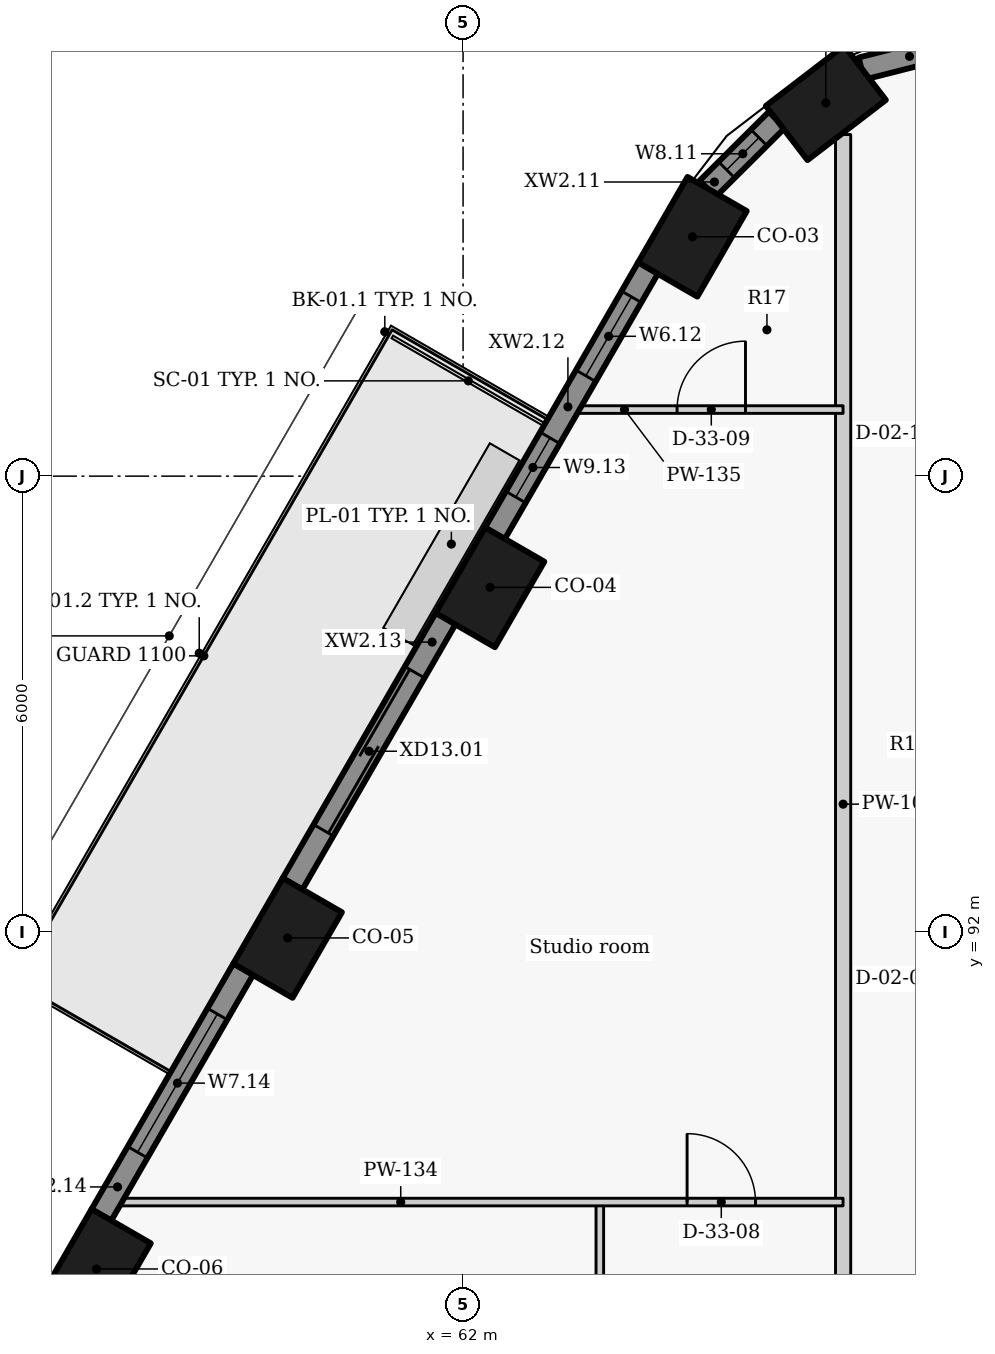
"""IFC4 building model, lengths in metres.
Left out: names, types, materials, properties, quantities, classifications, styles, units other than length and angle.
Written with IfcOpenShell. Run it as: python <this file> out.ifc"""

import sys

from ifc_helpers import new_model, si_unit, direction, frame, frame_2d, origin, origin_2d, place, context, subcontext, project, spatial, rectangle, extrude, element, fill, save


model = new_model("IFC4")
c1 = context("Model", 3, precision=1e-05, world=origin(), true_north=direction((0.0, 1.0)))
c2 = subcontext(c1, "Body", "Model", "MODEL_VIEW")
j1 = project(units=[si_unit("LENGTHUNIT", "METRE"), si_unit("PLANEANGLEUNIT", "RADIAN")], contexts=[c1])
p1 = place(None, origin())
s1 = spatial("IfcSite", under=j1, at=p1, CompositionType="ELEMENT")
p2 = place(p1, origin())
s2 = spatial("IfcBuilding", under=s1, at=p2, CompositionType="ELEMENT")
p3 = place(p2, frame((0.0, 0.0, 140.4)))
s3 = spatial("IfcBuildingStorey", under=s2, at=p3, CompositionType="ELEMENT", Elevation=140.4)
for number, where, z_axis, x_axis in (
    (1, (66.773, 102.91, 0.0), (0.0, 0.0, 1.0), (-0.793, -0.609, 0.0)),
    (2, (65.018, 101.149, 0.0), (0.0, 0.0, 1.0), (-0.5, -0.866, 0.0)),
    (3, (62.354, 96.537, 0.0), (0.0, 0.0, 1.0), (-0.5, -0.866, 0.0)),
    (4, (59.692, 91.925, 0.0), (0.0, 0.0, 1.0), (-0.5, -0.866, 0.0)),
    (5, (57.177, 87.57, 0.0), (0.0, 0.0, 1.0), (-0.5, -0.866, 0.0)),
):
    element("IfcColumn", number, at=place(p3, frame(where, z_axis=z_axis, x_axis=x_axis)), inside=s3, PredefinedType="COLUMN", context=c2, shape_type="SweptSolid", body=[
        extrude(rectangle(XDim=1.3, YDim=0.9, at=origin_2d()), origin(), (0.0, 0.0, 1.0), 3.3),
    ])
p4 = place(p3, frame((68.506, 103.683, 0.0), z_axis=(0.0, 0.0, 1.0), x_axis=(-0.96924493129, -0.246098076322, 0.0)))
e6 = element("IfcWall", 6, at=p4, inside=s3, PredefinedType="SOLIDWALL", context=c2, shape_type="SweptSolid", body=[
    extrude(rectangle(XDim=1.305, YDim=0.3, at=frame_2d((0.653, 0.0))), origin(), (0.0, 0.0, 1.0), 2.425),
])
p5 = place(p3, frame((66.129, 102.688, 0.0), z_axis=(0.0, 0.0, 1.0), x_axis=(-0.70881270082, -0.705396735997, 0.0)))
e7 = element("IfcWall", 7, at=p5, inside=s3, PredefinedType="SOLIDWALL", context=c2, shape_type="SweptSolid", body=[
    extrude(rectangle(XDim=1.286, YDim=0.3, at=frame_2d((0.643, 0.0))), origin(), (0.0, 0.0, 1.0), 2.425),
])
p6 = place(p5, frame((0.333, 0.0, 0.9)))
e8 = element("IfcOpeningElement", 8, at=p6, cuts=e7, PredefinedType="OPENING", context=c2, shape_type="SweptSolid", body=[
    extrude(rectangle(XDim=0.6, YDim=1.1, at=frame_2d((0.3, 0.55))), frame((0.0, 0.16, 0.0), z_axis=(0.0, -1.0, 0.0), x_axis=(1.0, 0.0, 0.0)), (0.0, 0.0, 1.0), 0.32),
])
p7 = place(p3, frame((64.435, 100.74, 0.0), z_axis=(0.0, 0.0, 1.0), x_axis=(-0.500031546601, -0.86600718958, 0.0)))
e9 = element("IfcWall", 9, at=p7, inside=s3, PredefinedType="SOLIDWALL", context=c2, shape_type="SweptSolid", body=[
    extrude(rectangle(XDim=4.034, YDim=0.3, at=frame_2d((2.017, 0.0))), origin(), (0.0, 0.0, 1.0), 2.425),
])
p8 = place(p7, frame((0.439, 0.0, 0.9)))
e10 = element("IfcOpeningElement", 10, at=p8, cuts=e9, PredefinedType="OPENING", context=c2, shape_type="SweptSolid", body=[
    extrude(rectangle(XDim=1.2, YDim=1.1, at=frame_2d((0.6, 0.55))), frame((0.0, 0.16, 0.0), z_axis=(0.0, -1.0, 0.0), x_axis=(1.0, 0.0, 0.0)), (0.0, 0.0, 1.0), 0.32),
])
p9 = place(p7, frame((2.583, 0.0, 0.9)))
e11 = element("IfcOpeningElement", 11, at=p9, cuts=e9, PredefinedType="OPENING", context=c2, shape_type="SweptSolid", body=[
    extrude(rectangle(XDim=0.9, YDim=1.1, at=frame_2d((0.45, 0.55))), frame((0.0, 0.16, 0.0), z_axis=(0.0, -1.0, 0.0), x_axis=(1.0, 0.0, 0.0)), (0.0, 0.0, 1.0), 0.32),
])
p10 = place(p3, frame((61.772, 96.128, 0.0), z_axis=(0.0, 0.0, 1.0), x_axis=(-0.500031546601, -0.86600718958, 0.0)))
e12 = element("IfcWall", 12, at=p10, inside=s3, PredefinedType="SOLIDWALL", context=c2, shape_type="SweptSolid", body=[
    extrude(rectangle(XDim=4.034, YDim=0.3, at=frame_2d((2.017, 0.0))), origin(), (0.0, 0.0, 1.0), 2.425),
])
p11 = place(p10, frame((0.817, 0.0, 0.0)))
e13 = element("IfcOpeningElement", 13, at=p11, cuts=e12, PredefinedType="OPENING", context=c2, shape_type="SweptSolid", body=[
    extrude(rectangle(XDim=2.4, YDim=2.0, at=frame_2d((1.2, 1.0))), frame((0.0, 0.16, 0.0), z_axis=(0.0, -1.0, 0.0), x_axis=(1.0, 0.0, 0.0)), (0.0, 0.0, 1.0), 0.32),
])
p12 = place(p3, frame((59.109, 91.515, 0.0), z_axis=(0.0, 0.0, 1.0), x_axis=(-0.499933594891, -0.866063739398, 0.0)))
e14 = element("IfcWall", 14, at=p12, inside=s3, PredefinedType="SOLIDWALL", context=c2, shape_type="SweptSolid", body=[
    extrude(rectangle(XDim=3.737, YDim=0.3, at=frame_2d((1.868, 0.0))), origin(), (0.0, 0.0, 1.0), 2.425),
])
p13 = place(p12, frame((0.683, 0.0, 0.9)))
e15 = element("IfcOpeningElement", 15, at=p13, cuts=e14, PredefinedType="OPENING", context=c2, shape_type="SweptSolid", body=[
    extrude(rectangle(XDim=2.1, YDim=1.1, at=frame_2d((1.05, 0.55))), frame((0.0, 0.16, 0.0), z_axis=(0.0, -1.0, 0.0), x_axis=(1.0, 0.0, 0.0)), (0.0, 0.0, 1.0), 0.32),
])
p14 = place(p3, frame((67.0, 56.833, 0.0), z_axis=(0.0, 0.0, 1.0), x_axis=(0.0, 1.0, 0.0)))
e16 = element("IfcWall", 16, at=p14, inside=s3, PredefinedType="PARTITIONING", context=c2, shape_type="SweptSolid", body=[
    extrude(rectangle(XDim=45.661, YDim=0.2, at=frame_2d((22.831, 0.0))), origin(), (0.0, 0.0, 1.0), 2.405),
])
p15 = place(p14, frame((7.584, 0.0, 0.0)))
e17 = element("IfcOpeningElement", 17, at=p15, cuts=e16, PredefinedType="OPENING", context=c2, shape_type="SweptSolid", body=[
    extrude(rectangle(XDim=1.0, YDim=2.1, at=frame_2d((0.5, 1.05))), frame((0.0, 0.11, 0.0), z_axis=(0.0, -1.0, 0.0), x_axis=(1.0, 0.0, 0.0)), (0.0, 0.0, 1.0), 0.22),
])
p16 = place(p14, frame((16.442, 0.0, 0.0)))
e18 = element("IfcOpeningElement", 18, at=p16, cuts=e16, PredefinedType="OPENING", context=c2, shape_type="SweptSolid", body=[
    extrude(rectangle(XDim=1.0, YDim=2.1, at=frame_2d((0.5, 1.05))), frame((0.0, 0.11, 0.0), z_axis=(0.0, -1.0, 0.0), x_axis=(1.0, 0.0, 0.0)), (0.0, 0.0, 1.0), 0.22),
])
p17 = place(p14, frame((26.942, 0.0, 0.0)))
e19 = element("IfcOpeningElement", 19, at=p17, cuts=e16, PredefinedType="OPENING", context=c2, shape_type="SweptSolid", body=[
    extrude(rectangle(XDim=1.0, YDim=2.1, at=frame_2d((0.5, 1.05))), frame((0.0, 0.11, 0.0), z_axis=(0.0, -1.0, 0.0), x_axis=(1.0, 0.0, 0.0)), (0.0, 0.0, 1.0), 0.22),
])
p18 = place(p3, frame((63.799, 85.05, 0.0), z_axis=(0.0, 0.0, 1.0), x_axis=(0.0, 1.0, 0.0)))
e20 = element("IfcWall", 20, at=p18, inside=s3, PredefinedType="PARTITIONING", context=c2, shape_type="SweptSolid", body=[
    extrude(rectangle(XDim=3.4, YDim=0.1, at=frame_2d((1.7, 0.0))), origin(), (0.0, 0.0, 1.0), 3.025),
])
p19 = place(p3, frame((57.512, 88.45, 0.0), z_axis=(0.0, 0.0, 1.0), x_axis=(1.0, 0.0, 0.0)))
e21 = element("IfcWall", 21, at=p19, inside=s3, PredefinedType="PARTITIONING", context=c2, shape_type="SweptSolid", body=[
    extrude(rectangle(XDim=9.487, YDim=0.1, at=frame_2d((4.743, 0.0))), origin(), (0.0, 0.0, 1.0), 2.405),
])
p20 = place(p19, frame((7.435, 0.0, 0.0)))
e22 = element("IfcOpeningElement", 22, at=p20, cuts=e21, PredefinedType="OPENING", context=c2, shape_type="SweptSolid", body=[
    extrude(rectangle(XDim=0.9, YDim=2.1, at=frame_2d((0.45, 1.05))), frame((0.0, 0.06, 0.0), z_axis=(0.0, -1.0, 0.0), x_axis=(1.0, 0.0, 0.0)), (0.0, 0.0, 1.0), 0.12),
])
p21 = place(p3, frame((63.531, 98.876, 0.0), z_axis=(0.0, 0.0, 1.0), x_axis=(1.0, 0.0, 0.0)))
e23 = element("IfcWall", 23, at=p21, inside=s3, PredefinedType="PARTITIONING", context=c2, shape_type="SweptSolid", body=[
    extrude(rectangle(XDim=3.468, YDim=0.1, at=frame_2d((1.734, 0.0))), origin(), (0.0, 0.0, 1.0), 2.405),
])
p22 = place(p21, frame((1.284, 0.0, 0.0)))
e24 = element("IfcOpeningElement", 24, at=p22, cuts=e23, PredefinedType="OPENING", context=c2, shape_type="SweptSolid", body=[
    extrude(rectangle(XDim=0.9, YDim=2.1, at=frame_2d((0.45, 1.05))), frame((0.0, 0.06, 0.0), z_axis=(0.0, -1.0, 0.0), x_axis=(1.0, 0.0, 0.0)), (0.0, 0.0, 1.0), 0.12),
])
p23 = place(p6, origin())
e25 = element("IfcWindow", 25, at=p23, inside=s3, PartitioningType="SINGLE_PANEL", PredefinedType="WINDOW", context=c2, shape_type="SweptSolid", body=[
    extrude(rectangle(XDim=0.6, YDim=1.1, at=frame_2d((0.3, 0.55))), frame((0.0, 0.03, 0.0), z_axis=(0.0, -1.0, 0.0), x_axis=(1.0, 0.0, 0.0)), (0.0, 0.0, 1.0), 0.06),
])
fill(e8, e25)
p24 = place(p8, origin())
e26 = element("IfcWindow", 26, at=p24, inside=s3, PartitioningType="SINGLE_PANEL", PredefinedType="WINDOW", context=c2, shape_type="SweptSolid", body=[
    extrude(rectangle(XDim=1.2, YDim=1.1, at=frame_2d((0.6, 0.55))), frame((0.0, 0.03, 0.0), z_axis=(0.0, -1.0, 0.0), x_axis=(1.0, 0.0, 0.0)), (0.0, 0.0, 1.0), 0.06),
])
fill(e10, e26)
p25 = place(p9, origin())
e27 = element("IfcWindow", 27, at=p25, inside=s3, PartitioningType="SINGLE_PANEL", PredefinedType="WINDOW", context=c2, shape_type="SweptSolid", body=[
    extrude(rectangle(XDim=0.9, YDim=1.1, at=frame_2d((0.45, 0.55))), frame((0.0, 0.03, 0.0), z_axis=(0.0, -1.0, 0.0), x_axis=(1.0, 0.0, 0.0)), (0.0, 0.0, 1.0), 0.06),
])
fill(e11, e27)
p26 = place(p11, origin())
e28 = element("IfcDoor", 28, at=p26, inside=s3, OperationType="DOUBLE_DOOR_SLIDING", PredefinedType="DOOR", context=c2, shape_type="SweptSolid", body=[
    extrude(rectangle(XDim=2.4, YDim=2.0, at=frame_2d((1.2, 1.0))), frame((0.0, 0.025, 0.0), z_axis=(0.0, -1.0, 0.0), x_axis=(1.0, 0.0, 0.0)), (0.0, 0.0, 1.0), 0.05),
])
fill(e13, e28)
p27 = place(p13, origin())
e29 = element("IfcWindow", 29, at=p27, inside=s3, PartitioningType="SINGLE_PANEL", PredefinedType="WINDOW", context=c2, shape_type="SweptSolid", body=[
    extrude(rectangle(XDim=2.1, YDim=1.1, at=frame_2d((1.05, 0.55))), frame((0.0, 0.03, 0.0), z_axis=(0.0, -1.0, 0.0), x_axis=(1.0, 0.0, 0.0)), (0.0, 0.0, 1.0), 0.06),
])
fill(e15, e29)
p28 = place(p20, origin())
e30 = element("IfcDoor", 30, at=p28, inside=s3, OperationType="SINGLE_SWING_LEFT", PredefinedType="DOOR", context=c2, shape_type="SweptSolid", body=[
    extrude(rectangle(XDim=0.9, YDim=2.1, at=frame_2d((0.45, 1.05))), frame((0.0, 0.025, 0.0), z_axis=(0.0, -1.0, 0.0), x_axis=(1.0, 0.0, 0.0)), (0.0, 0.0, 1.0), 0.05),
])
fill(e22, e30)
p29 = place(p22, origin())
e31 = element("IfcDoor", 31, at=p29, inside=s3, OperationType="SINGLE_SWING_RIGHT", PredefinedType="DOOR", context=c2, shape_type="SweptSolid", body=[
    extrude(rectangle(XDim=0.9, YDim=2.1, at=frame_2d((0.45, 1.05))), frame((0.0, 0.025, 0.0), z_axis=(0.0, -1.0, 0.0), x_axis=(1.0, 0.0, 0.0)), (0.0, 0.0, 1.0), 0.05),
])
fill(e24, e31)
save(model, sys.argv[1])
